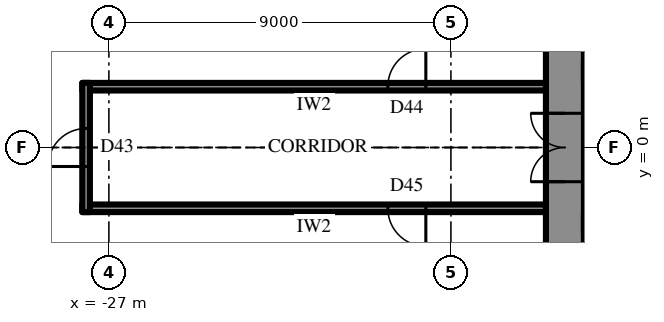
"""IFC4 building model, lengths in metres.
Left out: names, types, materials, properties, quantities, classifications, styles, units other than length and angle.
Written with IfcOpenShell. Run it as: python <this file> out.ifc"""

import sys

from ifc_helpers import new_model, si_unit, direction, frame, frame_2d, origin, place, context, subcontext, project, spatial, rectangle, extrude, element, fill, save


model = new_model("IFC4")
c1 = context("Model", 3, precision=1e-05, world=origin(), true_north=direction((0.0, 1.0)))
c2 = subcontext(c1, "Body", "Model", "MODEL_VIEW")
j1 = project(units=[si_unit("LENGTHUNIT", "METRE"), si_unit("PLANEANGLEUNIT", "RADIAN")], contexts=[c1])
p1 = place(None, origin())
s1 = spatial("IfcSite", under=j1, at=p1, CompositionType="ELEMENT")
p2 = place(p1, origin())
s2 = spatial("IfcBuilding", under=s1, at=p2, CompositionType="ELEMENT")
p3 = place(p2, frame((0.0, 0.0, 228.1)))
s3 = spatial("IfcBuildingStorey", under=s2, at=p3, CompositionType="ELEMENT", Elevation=228.1)
p4 = place(p3, frame((-15.0, 10.7, 0.0), z_axis=(0.0, 0.0, 1.0), x_axis=(0.0, -1.0, 0.0)))
e1 = element("IfcWall", 1, at=p4, inside=s3, PredefinedType="SHEAR", context=c2, shape_type="SweptSolid", body=[
    extrude(rectangle(XDim=21.4, YDim=1.0, at=frame_2d((10.7, 0.0))), origin(), (0.0, 0.0, 1.0), 4.2),
])
p5 = place(p4, frame((9.8, 0.0, 0.0)))
e2 = element("IfcOpeningElement", 2, at=p5, cuts=e1, PredefinedType="OPENING", context=c2, shape_type="SweptSolid", body=[
    extrude(rectangle(XDim=1.8, YDim=2.4, at=frame_2d((0.9, 1.2))), frame((0.0, 0.51, 0.0), z_axis=(0.0, -1.0, 0.0), x_axis=(1.0, 0.0, 0.0)), (0.0, 0.0, 1.0), 1.02),
])
p6 = place(p3, frame((-12.3, -2.0, 0.0), z_axis=(0.0, 0.0, 1.0), x_axis=(-1.0, 0.0, 0.0)))
e3 = element("IfcWall", 3, at=p6, inside=s3, PredefinedType="SHEAR", context=c2, shape_type="SweptSolid", body=[
    extrude(rectangle(XDim=2.2, YDim=0.5, at=frame_2d((1.1, 0.0))), origin(), (0.0, 0.0, 1.0), 4.2),
])
p7 = place(p6, frame((0.8, 0.0, 0.0)))
e4 = element("IfcOpeningElement", 4, at=p7, cuts=e3, PredefinedType="OPENING", context=c2, shape_type="SweptSolid", body=[
    extrude(rectangle(XDim=0.9, YDim=2.2, at=frame_2d((0.45, 1.1))), frame((0.0, 0.26, 0.0), z_axis=(0.0, -1.0, 0.0), x_axis=(1.0, 0.0, 0.0)), (0.0, 0.0, 1.0), 0.52),
])
p8 = place(p3, frame((-31.913, -2.425, 0.0), z_axis=(0.0, 0.0, 1.0), x_axis=(0.500001051461, -0.866024796723, 0.0)))
e5 = element("IfcWall", 5, at=p8, inside=s3, PredefinedType="SOLIDWALL", context=c2, shape_type="SweptSolid", body=[
    extrude(rectangle(XDim=27.713, YDim=0.3, at=frame_2d((13.856, 0.0))), origin(), (0.0, 0.0, 1.0), 2.0),
])
p9 = place(p8, frame((0.959, 0.0, 0.6)))
e6 = element("IfcOpeningElement", 6, at=p9, cuts=e5, PredefinedType="OPENING", context=c2, shape_type="SweptSolid", body=[
    extrude(rectangle(XDim=2.7, YDim=1.15, at=frame_2d((1.35, 0.575))), frame((0.0, 0.16, 0.0), z_axis=(0.0, -1.0, 0.0), x_axis=(1.0, 0.0, 0.0)), (0.0, 0.0, 1.0), 0.32),
])
p10 = place(p8, frame((5.578, 0.0, 0.6)))
e7 = element("IfcOpeningElement", 7, at=p10, cuts=e5, PredefinedType="OPENING", context=c2, shape_type="SweptSolid", body=[
    extrude(rectangle(XDim=2.7, YDim=1.15, at=frame_2d((1.35, 0.575))), frame((0.0, 0.16, 0.0), z_axis=(0.0, -1.0, 0.0), x_axis=(1.0, 0.0, 0.0)), (0.0, 0.0, 1.0), 0.32),
])
p11 = place(p8, frame((10.197, 0.0, 0.6)))
e8 = element("IfcOpeningElement", 8, at=p11, cuts=e5, PredefinedType="OPENING", context=c2, shape_type="SweptSolid", body=[
    extrude(rectangle(XDim=2.7, YDim=1.15, at=frame_2d((1.35, 0.575))), frame((0.0, 0.16, 0.0), z_axis=(0.0, -1.0, 0.0), x_axis=(1.0, 0.0, 0.0)), (0.0, 0.0, 1.0), 0.32),
])
p12 = place(p8, frame((14.816, 0.0, 0.6)))
e9 = element("IfcOpeningElement", 9, at=p12, cuts=e5, PredefinedType="OPENING", context=c2, shape_type="SweptSolid", body=[
    extrude(rectangle(XDim=2.7, YDim=1.15, at=frame_2d((1.35, 0.575))), frame((0.0, 0.16, 0.0), z_axis=(0.0, -1.0, 0.0), x_axis=(1.0, 0.0, 0.0)), (0.0, 0.0, 1.0), 0.32),
])
p13 = place(p8, frame((19.435, 0.0, 0.6)))
e10 = element("IfcOpeningElement", 10, at=p13, cuts=e5, PredefinedType="OPENING", context=c2, shape_type="SweptSolid", body=[
    extrude(rectangle(XDim=2.7, YDim=1.15, at=frame_2d((1.35, 0.575))), frame((0.0, 0.16, 0.0), z_axis=(0.0, -1.0, 0.0), x_axis=(1.0, 0.0, 0.0)), (0.0, 0.0, 1.0), 0.32),
])
p14 = place(p8, frame((24.053, 0.0, 0.6)))
e11 = element("IfcOpeningElement", 11, at=p14, cuts=e5, PredefinedType="OPENING", context=c2, shape_type="SweptSolid", body=[
    extrude(rectangle(XDim=2.7, YDim=1.15, at=frame_2d((1.35, 0.575))), frame((0.0, 0.16, 0.0), z_axis=(0.0, -1.0, 0.0), x_axis=(1.0, 0.0, 0.0)), (0.0, 0.0, 1.0), 0.32),
])
p15 = place(p3, frame((-15.5, 1.6, 0.0), z_axis=(0.0, 0.0, 1.0), x_axis=(-1.0, 0.0, 0.0)))
e12 = element("IfcWall", 12, at=p15, inside=s3, PredefinedType="PARTITIONING", context=c2, shape_type="SweptSolid", body=[
    extrude(rectangle(XDim=12.2, YDim=0.2, at=frame_2d((6.1, 0.0))), origin(), (0.0, 0.0, 1.0), 4.0),
])
p16 = place(p15, frame((3.16, 0.0, 0.0)))
e13 = element("IfcOpeningElement", 13, at=p16, cuts=e12, PredefinedType="OPENING", context=c2, shape_type="SweptSolid", body=[
    extrude(rectangle(XDim=1.0, YDim=2.2, at=frame_2d((0.5, 1.1))), frame((0.0, 0.11, 0.0), z_axis=(0.0, -1.0, 0.0), x_axis=(1.0, 0.0, 0.0)), (0.0, 0.0, 1.0), 0.22),
])
p17 = place(p3, frame((-15.5, -1.6, 0.0), z_axis=(0.0, 0.0, 1.0), x_axis=(-1.0, 0.0, 0.0)))
e14 = element("IfcWall", 14, at=p17, inside=s3, PredefinedType="PARTITIONING", context=c2, shape_type="SweptSolid", body=[
    extrude(rectangle(XDim=12.2, YDim=0.2, at=frame_2d((6.1, 0.0))), origin(), (0.0, 0.0, 1.0), 4.0),
])
p18 = place(p17, frame((3.16, 0.0, 0.0)))
e15 = element("IfcOpeningElement", 15, at=p18, cuts=e14, PredefinedType="OPENING", context=c2, shape_type="SweptSolid", body=[
    extrude(rectangle(XDim=1.0, YDim=2.2, at=frame_2d((0.5, 1.1))), frame((0.0, 0.11, 0.0), z_axis=(0.0, -1.0, 0.0), x_axis=(1.0, 0.0, 0.0)), (0.0, 0.0, 1.0), 0.22),
])
p19 = place(p3, frame((-27.6, -1.7, 0.0), z_axis=(0.0, 0.0, 1.0), x_axis=(0.0, 1.0, 0.0)))
e16 = element("IfcWall", 16, at=p19, inside=s3, PredefinedType="PARTITIONING", context=c2, shape_type="SweptSolid", body=[
    extrude(rectangle(XDim=3.4, YDim=0.2, at=frame_2d((1.7, 0.0))), origin(), (0.0, 0.0, 1.0), 4.0),
])
p20 = place(p19, frame((1.2, 0.0, 0.0)))
e17 = element("IfcOpeningElement", 17, at=p20, cuts=e16, PredefinedType="OPENING", context=c2, shape_type="SweptSolid", body=[
    extrude(rectangle(XDim=1.0, YDim=2.2, at=frame_2d((0.5, 1.1))), frame((0.0, 0.11, 0.0), z_axis=(0.0, -1.0, 0.0), x_axis=(1.0, 0.0, 0.0)), (0.0, 0.0, 1.0), 0.22),
])
p21 = place(p5, frame((1.8, 0.0, 0.0), z_axis=(0.0, 0.0, 1.0), x_axis=(-1.0, 0.0, 0.0)))
e18 = element("IfcDoor", 18, at=p21, inside=s3, OperationType="DOUBLE_DOOR_SINGLE_SWING", PredefinedType="DOOR", context=c2, shape_type="SweptSolid", body=[
    extrude(rectangle(XDim=1.8, YDim=2.4, at=frame_2d((0.9, 1.2))), frame((0.0, 0.025, 0.0), z_axis=(0.0, -1.0, 0.0), x_axis=(1.0, 0.0, 0.0)), (0.0, 0.0, 1.0), 0.05),
])
fill(e2, e18)
p22 = place(p16, frame((1.0, 0.0, 0.0), z_axis=(0.0, 0.0, 1.0), x_axis=(-1.0, 0.0, 0.0)))
e19 = element("IfcDoor", 19, at=p22, inside=s3, OperationType="SINGLE_SWING_LEFT", PredefinedType="DOOR", context=c2, shape_type="SweptSolid", body=[
    extrude(rectangle(XDim=1.0, YDim=2.2, at=frame_2d((0.5, 1.1))), frame((0.0, 0.025, 0.0), z_axis=(0.0, -1.0, 0.0), x_axis=(1.0, 0.0, 0.0)), (0.0, 0.0, 1.0), 0.05),
])
fill(e13, e19)
p23 = place(p18, origin())
e20 = element("IfcDoor", 20, at=p23, inside=s3, OperationType="SINGLE_SWING_RIGHT", PredefinedType="DOOR", context=c2, shape_type="SweptSolid", body=[
    extrude(rectangle(XDim=1.0, YDim=2.2, at=frame_2d((0.5, 1.1))), frame((0.0, 0.025, 0.0), z_axis=(0.0, -1.0, 0.0), x_axis=(1.0, 0.0, 0.0)), (0.0, 0.0, 1.0), 0.05),
])
fill(e15, e20)
p24 = place(p20, origin())
e21 = element("IfcDoor", 21, at=p24, inside=s3, OperationType="SINGLE_SWING_RIGHT", PredefinedType="DOOR", context=c2, shape_type="SweptSolid", body=[
    extrude(rectangle(XDim=1.0, YDim=2.2, at=frame_2d((0.5, 1.1))), frame((0.0, 0.025, 0.0), z_axis=(0.0, -1.0, 0.0), x_axis=(1.0, 0.0, 0.0)), (0.0, 0.0, 1.0), 0.05),
])
fill(e17, e21)
save(model, sys.argv[1])
